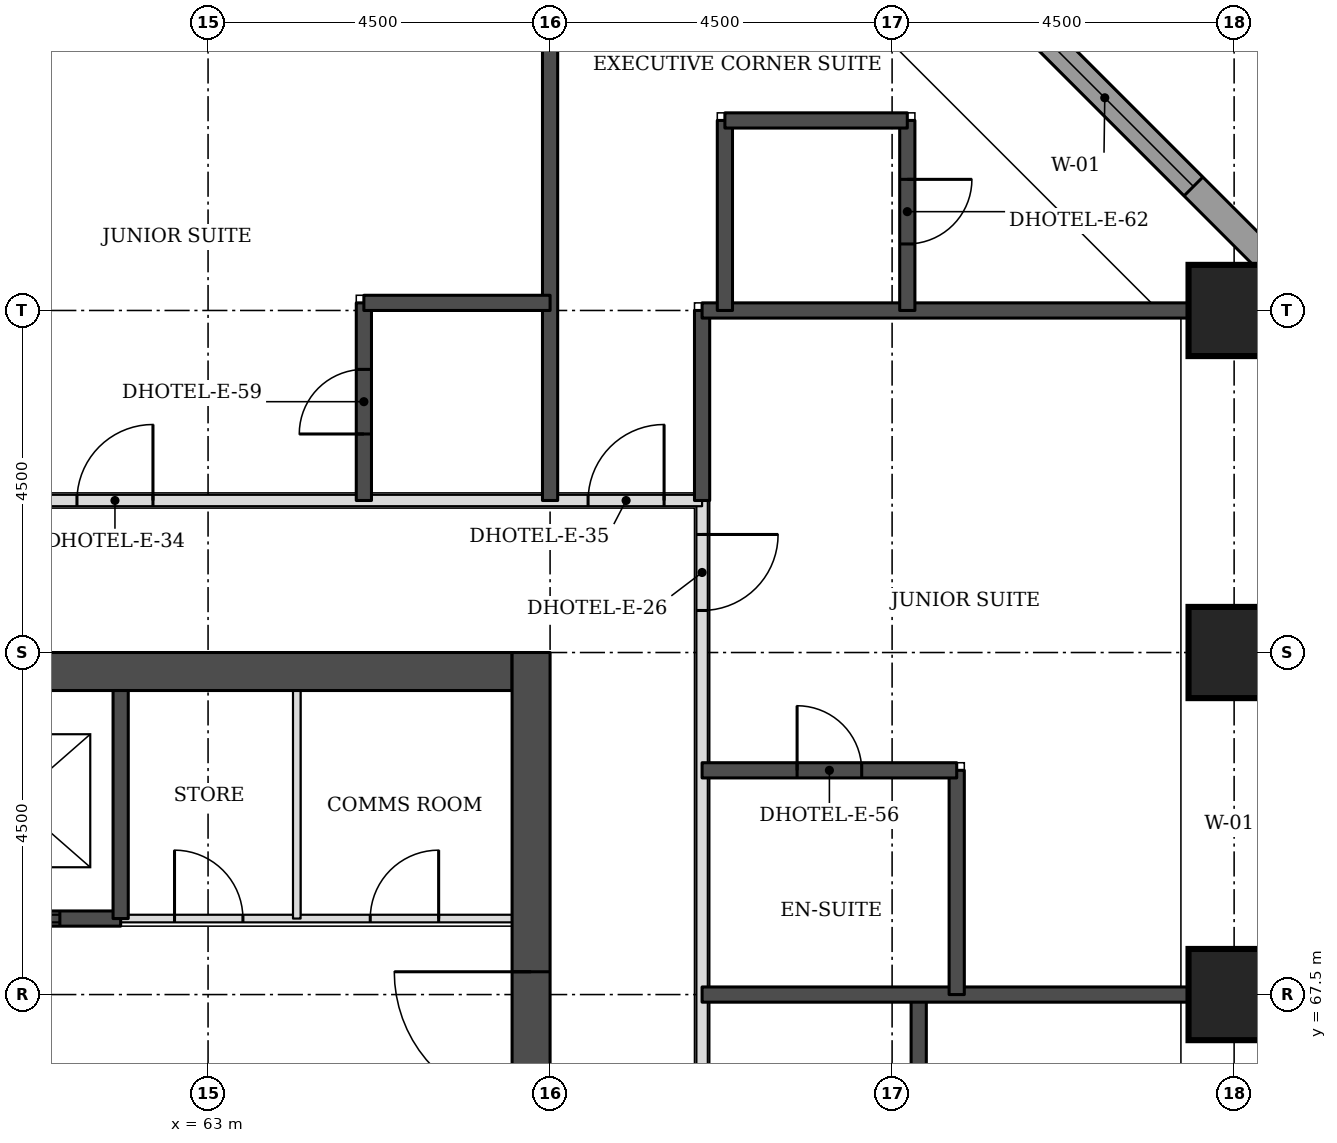
"""IFC4 building model, lengths in metres.
Left out: names, types, materials, properties, quantities, classifications, styles, units other than length and angle.
Written with IfcOpenShell. Run it as: python <this file> out.ifc"""

import sys

from ifc_helpers import new_model, si_unit, direction, frame, frame_2d, origin, origin_2d, place, context, subcontext, project, spatial, rectangle, extrude, element, fill, save


model = new_model("IFC4")
c1 = context("Model", 3, precision=1e-05, world=origin(), true_north=direction((0.0, 1.0)))
c2 = subcontext(c1, "Body", "Model", "MODEL_VIEW")
j1 = project(units=[si_unit("LENGTHUNIT", "METRE"), si_unit("PLANEANGLEUNIT", "RADIAN")], contexts=[c1])
p1 = place(None, origin())
s1 = spatial("IfcSite", under=j1, at=p1, CompositionType="ELEMENT")
p2 = place(p1, origin())
s2 = spatial("IfcBuilding", under=s1, at=p2, CompositionType="ELEMENT")
p3 = place(p2, frame((0.0, 0.0, 62.7)))
s3 = spatial("IfcBuildingStorey", under=s2, at=p3, CompositionType="ELEMENT", Elevation=62.7)
for number, where, z_axis, x_axis in (
    (1, (76.5, 67.5, 0.0), (0.0, 0.0, 1.0), (1.0, 0.0, 0.0)),
    (2, (76.5, 72.0, 0.0), (0.0, 0.0, 1.0), (1.0, 0.0, 0.0)),
    (3, (76.5, 76.5, 0.0), (0.0, 0.0, 1.0), (1.0, 0.0, 0.0)),
):
    element("IfcColumn", number, at=place(p3, frame(where, z_axis=z_axis, x_axis=x_axis)), inside=s3, PredefinedType="COLUMN", context=c2, shape_type="SweptSolid", body=[
        extrude(rectangle(XDim=1.2, YDim=1.2, at=origin_2d()), origin(), (0.0, 0.0, 1.0), 3.3),
    ])
p4 = place(p3, frame((45.5, 71.75, 0.0), z_axis=(0.0, 0.0, 1.0), x_axis=(1.0, 0.0, 0.0)))
e4 = element("IfcWall", 4, at=p4, inside=s3, PredefinedType="SHEAR", context=c2, shape_type="SweptSolid", body=[
    extrude(rectangle(XDim=21.5, YDim=0.5, at=frame_2d((10.75, 0.0))), origin(), (0.0, 0.0, 1.0), 3.3),
])
p5 = place(p3, frame((67.25, 49.5, 0.0), z_axis=(0.0, 0.0, 1.0), x_axis=(0.0, 1.0, 0.0)))
e5 = element("IfcWall", 5, at=p5, inside=s3, PredefinedType="SHEAR", context=c2, shape_type="SweptSolid", body=[
    extrude(rectangle(XDim=22.5, YDim=0.5, at=frame_2d((11.25, 0.0))), origin(), (0.0, 0.0, 1.0), 3.3),
])
p6 = place(p5, frame((4.2, 0.0, 0.0)))
e6 = element("IfcOpeningElement", 6, at=p6, cuts=e5, PredefinedType="OPENING", context=c2, shape_type="SweptSolid", body=[
    extrude(rectangle(XDim=1.8, YDim=2.1, at=frame_2d((0.9, 1.05))), frame((0.0, 0.26, 0.0), z_axis=(0.0, -1.0, 0.0), x_axis=(1.0, 0.0, 0.0)), (0.0, 0.0, 1.0), 0.52),
])
p7 = place(p5, frame((6.9, 0.0, 0.0)))
e7 = element("IfcOpeningElement", 7, at=p7, cuts=e5, PredefinedType="OPENING", context=c2, shape_type="SweptSolid", body=[
    extrude(rectangle(XDim=1.1, YDim=2.1, at=frame_2d((0.55, 1.05))), frame((0.0, 0.26, 0.0), z_axis=(0.0, -1.0, 0.0), x_axis=(1.0, 0.0, 0.0)), (0.0, 0.0, 1.0), 0.52),
])
p8 = place(p5, frame((13.6, 0.0, 0.0)))
e8 = element("IfcOpeningElement", 8, at=p8, cuts=e5, PredefinedType="OPENING", context=c2, shape_type="SweptSolid", body=[
    extrude(rectangle(XDim=1.1, YDim=2.1, at=frame_2d((0.55, 1.05))), frame((0.0, 0.26, 0.0), z_axis=(0.0, -1.0, 0.0), x_axis=(1.0, 0.0, 0.0)), (0.0, 0.0, 1.0), 0.52),
])
p9 = place(p5, frame((16.5, 0.0, 0.0)))
e9 = element("IfcOpeningElement", 9, at=p9, cuts=e5, PredefinedType="OPENING", context=c2, shape_type="SweptSolid", body=[
    extrude(rectangle(XDim=1.8, YDim=2.1, at=frame_2d((0.9, 1.05))), frame((0.0, 0.26, 0.0), z_axis=(0.0, -1.0, 0.0), x_axis=(1.0, 0.0, 0.0)), (0.0, 0.0, 1.0), 0.52),
])
p10 = place(p3, frame((77.326, 76.77, 0.0), z_axis=(0.0, 0.0, 1.0), x_axis=(-0.707106781187, 0.707106781187, 0.0)))
e10 = element("IfcWall", 10, at=p10, inside=s3, PredefinedType="STANDARD", context=c2, shape_type="SweptSolid", body=[
    extrude(rectangle(XDim=7.151, YDim=0.35, at=frame_2d((3.576, 0.0))), origin(), (0.0, 0.0, 1.0), 3.055),
])
p11 = place(p10, frame((1.926, 0.0, 0.8)))
e11 = element("IfcOpeningElement", 11, at=p11, cuts=e10, PredefinedType="OPENING", context=c2, shape_type="SweptSolid", body=[
    extrude(rectangle(XDim=3.3, YDim=1.5, at=frame_2d((1.65, 0.75))), frame((0.0, 0.185, 0.0), z_axis=(0.0, -1.0, 0.0), x_axis=(1.0, 0.0, 0.0)), (0.0, 0.0, 1.0), 0.37),
])
p12 = place(p3, frame((69.5, 47.5, 0.0), z_axis=(0.0, 0.0, 1.0), x_axis=(0.0, 1.0, 0.0)))
e12 = element("IfcWall", 12, at=p12, inside=s3, PredefinedType="PARTITIONING", context=c2, shape_type="SweptSolid", body=[
    extrude(rectangle(XDim=26.5, YDim=0.15, at=frame_2d((13.25, 0.0))), origin(), (0.0, 0.0, 1.0), 3.08),
])
p13 = place(p12, frame((25.053, 0.0, 0.0)))
e13 = element("IfcOpeningElement", 13, at=p13, cuts=e12, PredefinedType="OPENING", context=c2, shape_type="SweptSolid", body=[
    extrude(rectangle(XDim=1.0, YDim=2.1, at=frame_2d((0.5, 1.05))), frame((0.0, 0.085, 0.0), z_axis=(0.0, -1.0, 0.0), x_axis=(1.0, 0.0, 0.0)), (0.0, 0.0, 1.0), 0.17),
])
p14 = place(p12, frame((13.775, 0.0, 0.0)))
e14 = element("IfcOpeningElement", 14, at=p14, cuts=e12, PredefinedType="OPENING", context=c2, shape_type="SweptSolid", body=[
    extrude(rectangle(XDim=1.0, YDim=2.1, at=frame_2d((0.5, 1.05))), frame((0.0, 0.085, 0.0), z_axis=(0.0, -1.0, 0.0), x_axis=(1.0, 0.0, 0.0)), (0.0, 0.0, 1.0), 0.17),
])
p15 = place(p12, frame((7.65, 0.0, 0.0)))
e15 = element("IfcOpeningElement", 15, at=p15, cuts=e12, PredefinedType="OPENING", context=c2, shape_type="SweptSolid", body=[
    extrude(rectangle(XDim=1.1, YDim=2.1, at=frame_2d((0.55, 1.05))), frame((0.0, 0.085, 0.0), z_axis=(0.0, -1.0, 0.0), x_axis=(1.0, 0.0, 0.0)), (0.0, 0.0, 1.0), 0.17),
])
p16 = place(p12, frame((0.447, 0.0, 0.0)))
e16 = element("IfcOpeningElement", 16, at=p16, cuts=e12, PredefinedType="OPENING", context=c2, shape_type="SweptSolid", body=[
    extrude(rectangle(XDim=1.0, YDim=2.1, at=frame_2d((0.5, 1.05))), frame((0.0, 0.085, 0.0), z_axis=(0.0, -1.0, 0.0), x_axis=(1.0, 0.0, 0.0)), (0.0, 0.0, 1.0), 0.17),
])
p17 = place(p3, frame((43.0, 74.0, 0.0), z_axis=(0.0, 0.0, 1.0), x_axis=(1.0, 0.0, 0.0)))
e17 = element("IfcWall", 17, at=p17, inside=s3, PredefinedType="PARTITIONING", context=c2, shape_type="SweptSolid", body=[
    extrude(rectangle(XDim=26.5, YDim=0.15, at=frame_2d((13.25, 0.0))), origin(), (0.0, 0.0, 1.0), 3.08),
])
p18 = place(p17, frame((2.825, 0.0, 0.0)))
e18 = element("IfcOpeningElement", 18, at=p18, cuts=e17, PredefinedType="OPENING", context=c2, shape_type="SweptSolid", body=[
    extrude(rectangle(XDim=1.0, YDim=2.1, at=frame_2d((0.5, 1.05))), frame((0.0, 0.085, 0.0), z_axis=(0.0, -1.0, 0.0), x_axis=(1.0, 0.0, 0.0)), (0.0, 0.0, 1.0), 0.17),
])
p19 = place(p17, frame((11.975, 0.0, 0.0)))
e19 = element("IfcOpeningElement", 19, at=p19, cuts=e17, PredefinedType="OPENING", context=c2, shape_type="SweptSolid", body=[
    extrude(rectangle(XDim=1.0, YDim=2.1, at=frame_2d((0.5, 1.05))), frame((0.0, 0.085, 0.0), z_axis=(0.0, -1.0, 0.0), x_axis=(1.0, 0.0, 0.0)), (0.0, 0.0, 1.0), 0.17),
])
p20 = place(p17, frame((18.275, 0.0, 0.0)))
e20 = element("IfcOpeningElement", 20, at=p20, cuts=e17, PredefinedType="OPENING", context=c2, shape_type="SweptSolid", body=[
    extrude(rectangle(XDim=1.0, YDim=2.1, at=frame_2d((0.5, 1.05))), frame((0.0, 0.085, 0.0), z_axis=(0.0, -1.0, 0.0), x_axis=(1.0, 0.0, 0.0)), (0.0, 0.0, 1.0), 0.17),
])
p21 = place(p17, frame((0.5, 0.0, 0.0)))
e21 = element("IfcOpeningElement", 21, at=p21, cuts=e17, PredefinedType="OPENING", context=c2, shape_type="SweptSolid", body=[
    extrude(rectangle(XDim=1.0, YDim=2.1, at=frame_2d((0.5, 1.05))), frame((0.0, 0.085, 0.0), z_axis=(0.0, -1.0, 0.0), x_axis=(1.0, 0.0, 0.0)), (0.0, 0.0, 1.0), 0.17),
])
p22 = place(p17, frame((25.0, 0.0, 0.0)))
e22 = element("IfcOpeningElement", 22, at=p22, cuts=e17, PredefinedType="OPENING", context=c2, shape_type="SweptSolid", body=[
    extrude(rectangle(XDim=1.0, YDim=2.1, at=frame_2d((0.5, 1.05))), frame((0.0, 0.085, 0.0), z_axis=(0.0, -1.0, 0.0), x_axis=(1.0, 0.0, 0.0)), (0.0, 0.0, 1.0), 0.17),
])
p23 = place(p3, frame((72.35, 65.05, 0.0), z_axis=(0.0, 0.0, 1.0), x_axis=(0.0, 1.0, 0.0)))
e23 = element("IfcWall", 23, at=p23, inside=s3, PredefinedType="SOLIDWALL", context=c2, shape_type="SweptSolid", body=[
    extrude(rectangle(XDim=2.45, YDim=0.2, at=frame_2d((1.225, 0.0))), origin(), (0.0, 0.0, 1.0), 3.08),
])
p24 = place(p3, frame((69.5, 67.5, 0.0), z_axis=(0.0, 0.0, 1.0), x_axis=(1.0, 0.0, 0.0)))
e24 = element("IfcWall", 24, at=p24, inside=s3, PredefinedType="SOLIDWALL", context=c2, shape_type="SweptSolid", body=[
    extrude(rectangle(XDim=6.4, YDim=0.2, at=frame_2d((3.2, 0.0))), origin(), (0.0, 0.0, 1.0), 3.08),
])
p25 = place(p3, frame((72.85, 67.5, 0.0), z_axis=(0.0, 0.0, 1.0), x_axis=(0.0, 1.0, 0.0)))
e25 = element("IfcWall", 25, at=p25, inside=s3, PredefinedType="SOLIDWALL", context=c2, shape_type="SweptSolid", body=[
    extrude(rectangle(XDim=2.95, YDim=0.2, at=frame_2d((1.475, 0.0))), origin(), (0.0, 0.0, 1.0), 3.08),
])
p26 = place(p3, frame((69.5, 70.45, 0.0), z_axis=(0.0, 0.0, 1.0), x_axis=(1.0, 0.0, 0.0)))
e26 = element("IfcWall", 26, at=p26, inside=s3, PredefinedType="SOLIDWALL", context=c2, shape_type="SweptSolid", body=[
    extrude(rectangle(XDim=3.35, YDim=0.2, at=frame_2d((1.675, 0.0))), origin(), (0.0, 0.0, 1.0), 3.08),
])
p27 = place(p26, frame((1.25, 0.0, 0.0)))
e27 = element("IfcOpeningElement", 27, at=p27, cuts=e26, PredefinedType="OPENING", context=c2, shape_type="SweptSolid", body=[
    extrude(rectangle(XDim=0.85, YDim=2.1, at=frame_2d((0.425, 1.05))), frame((0.0, 0.11, 0.0), z_axis=(0.0, -1.0, 0.0), x_axis=(1.0, 0.0, 0.0)), (0.0, 0.0, 1.0), 0.22),
])
p28 = place(p3, frame((65.05, 74.0, 0.0), z_axis=(0.0, 0.0, 1.0), x_axis=(0.0, 1.0, 0.0)))
e28 = element("IfcWall", 28, at=p28, inside=s3, PredefinedType="SOLIDWALL", context=c2, shape_type="SweptSolid", body=[
    extrude(rectangle(XDim=2.6, YDim=0.2, at=frame_2d((1.3, 0.0))), origin(), (0.0, 0.0, 1.0), 3.08),
])
p29 = place(p28, frame((0.875, 0.0, 0.0)))
e29 = element("IfcOpeningElement", 29, at=p29, cuts=e28, PredefinedType="OPENING", context=c2, shape_type="SweptSolid", body=[
    extrude(rectangle(XDim=0.85, YDim=2.1, at=frame_2d((0.425, 1.05))), frame((0.0, 0.11, 0.0), z_axis=(0.0, -1.0, 0.0), x_axis=(1.0, 0.0, 0.0)), (0.0, 0.0, 1.0), 0.22),
])
p30 = place(p3, frame((67.5, 74.0, 0.0), z_axis=(0.0, 0.0, 1.0), x_axis=(0.0, 1.0, 0.0)))
e30 = element("IfcWall", 30, at=p30, inside=s3, PredefinedType="SOLIDWALL", context=c2, shape_type="SweptSolid", body=[
    extrude(rectangle(XDim=6.4, YDim=0.2, at=frame_2d((3.2, 0.0))), origin(), (0.0, 0.0, 1.0), 3.08),
])
p31 = place(p3, frame((69.5, 74.0, 0.0), z_axis=(0.0, 0.0, 1.0), x_axis=(0.0, 1.0, 0.0)))
e31 = element("IfcWall", 31, at=p31, inside=s3, PredefinedType="SOLIDWALL", context=c2, shape_type="SweptSolid", body=[
    extrude(rectangle(XDim=2.5, YDim=0.2, at=frame_2d((1.25, 0.0))), origin(), (0.0, 0.0, 1.0), 3.08),
])
p32 = place(p3, frame((69.5, 76.5, 0.0), z_axis=(0.0, 0.0, 1.0), x_axis=(1.0, 0.0, 0.0)))
e32 = element("IfcWall", 32, at=p32, inside=s3, PredefinedType="SOLIDWALL", context=c2, shape_type="SweptSolid", body=[
    extrude(rectangle(XDim=6.4, YDim=0.2, at=frame_2d((3.2, 0.0))), origin(), (0.0, 0.0, 1.0), 3.08),
])
p33 = place(p3, frame((69.8, 76.5, 0.0), z_axis=(0.0, 0.0, 1.0), x_axis=(0.0, 1.0, 0.0)))
e33 = element("IfcWall", 33, at=p33, inside=s3, PredefinedType="SOLIDWALL", context=c2, shape_type="SweptSolid", body=[
    extrude(rectangle(XDim=2.5, YDim=0.2, at=frame_2d((1.25, 0.0))), origin(), (0.0, 0.0, 1.0), 3.08),
])
p34 = place(p3, frame((72.2, 76.5, 0.0), z_axis=(0.0, 0.0, 1.0), x_axis=(0.0, 1.0, 0.0)))
e34 = element("IfcWall", 34, at=p34, inside=s3, PredefinedType="SOLIDWALL", context=c2, shape_type="SweptSolid", body=[
    extrude(rectangle(XDim=2.5, YDim=0.2, at=frame_2d((1.25, 0.0))), origin(), (0.0, 0.0, 1.0), 3.08),
])
p35 = place(p34, frame((0.875, 0.0, 0.0)))
e35 = element("IfcOpeningElement", 35, at=p35, cuts=e34, PredefinedType="OPENING", context=c2, shape_type="SweptSolid", body=[
    extrude(rectangle(XDim=0.85, YDim=2.1, at=frame_2d((0.425, 1.05))), frame((0.0, 0.11, 0.0), z_axis=(0.0, -1.0, 0.0), x_axis=(1.0, 0.0, 0.0)), (0.0, 0.0, 1.0), 0.22),
])
p36 = place(p3, frame((65.05, 76.6, 0.0), z_axis=(0.0, 0.0, 1.0), x_axis=(1.0, 0.0, 0.0)))
e36 = element("IfcWall", 36, at=p36, inside=s3, PredefinedType="SOLIDWALL", context=c2, shape_type="SweptSolid", body=[
    extrude(rectangle(XDim=2.45, YDim=0.2, at=frame_2d((1.225, 0.0))), origin(), (0.0, 0.0, 1.0), 3.08),
])
p37 = place(p3, frame((69.8, 79.0, 0.0), z_axis=(0.0, 0.0, 1.0), x_axis=(1.0, 0.0, 0.0)))
e37 = element("IfcWall", 37, at=p37, inside=s3, PredefinedType="SOLIDWALL", context=c2, shape_type="SweptSolid", body=[
    extrude(rectangle(XDim=2.4, YDim=0.2, at=frame_2d((1.2, 0.0))), origin(), (0.0, 0.0, 1.0), 3.08),
])
p38 = place(p3, frame((61.85, 68.5, 0.0), z_axis=(0.0, 0.0, 1.0), x_axis=(1.0, 0.0, 0.0)))
e38 = element("IfcWall", 38, at=p38, inside=s3, PredefinedType="PARTITIONING", context=c2, shape_type="SweptSolid", body=[
    extrude(rectangle(XDim=5.15, YDim=0.1, at=frame_2d((2.575, 0.0))), origin(), (0.0, 0.0, 1.0), 3.08),
])
p39 = place(p38, frame((3.284, 0.0, 0.0)))
e39 = element("IfcOpeningElement", 39, at=p39, cuts=e38, PredefinedType="OPENING", context=c2, shape_type="SweptSolid", body=[
    extrude(rectangle(XDim=0.9, YDim=2.1, at=frame_2d((0.45, 1.05))), frame((0.0, 0.06, 0.0), z_axis=(0.0, -1.0, 0.0), x_axis=(1.0, 0.0, 0.0)), (0.0, 0.0, 1.0), 0.12),
])
p40 = place(p38, frame((0.709, 0.0, 0.0)))
e40 = element("IfcOpeningElement", 40, at=p40, cuts=e38, PredefinedType="OPENING", context=c2, shape_type="SweptSolid", body=[
    extrude(rectangle(XDim=0.9, YDim=2.1, at=frame_2d((0.45, 1.05))), frame((0.0, 0.06, 0.0), z_axis=(0.0, -1.0, 0.0), x_axis=(1.0, 0.0, 0.0)), (0.0, 0.0, 1.0), 0.12),
])
p41 = place(p3, frame((50.65, 68.5, 0.0), z_axis=(0.0, 0.0, 1.0), x_axis=(1.0, 0.0, 0.0)))
e41 = element("IfcWall", 41, at=p41, inside=s3, PredefinedType="SOLIDWALL", context=c2, shape_type="SweptSolid", body=[
    extrude(rectangle(XDim=11.2, YDim=0.2, at=frame_2d((5.6, 0.0))), origin(), (0.0, 0.0, 1.0), 3.08),
])
p42 = place(p41, frame((0.8, 0.0, 0.0)))
e42 = element("IfcOpeningElement", 42, at=p42, cuts=e41, PredefinedType="OPENING", context=c2, shape_type="SweptSolid", body=[
    extrude(rectangle(XDim=1.2, YDim=2.1, at=frame_2d((0.6, 1.05))), frame((0.0, 0.11, 0.0), z_axis=(0.0, -1.0, 0.0), x_axis=(1.0, 0.0, 0.0)), (0.0, 0.0, 1.0), 0.22),
])
p43 = place(p41, frame((3.6, 0.0, 0.0)))
e43 = element("IfcOpeningElement", 43, at=p43, cuts=e41, PredefinedType="OPENING", context=c2, shape_type="SweptSolid", body=[
    extrude(rectangle(XDim=1.2, YDim=2.1, at=frame_2d((0.6, 1.05))), frame((0.0, 0.11, 0.0), z_axis=(0.0, -1.0, 0.0), x_axis=(1.0, 0.0, 0.0)), (0.0, 0.0, 1.0), 0.22),
])
p44 = place(p41, frame((6.4, 0.0, 0.0)))
e44 = element("IfcOpeningElement", 44, at=p44, cuts=e41, PredefinedType="OPENING", context=c2, shape_type="SweptSolid", body=[
    extrude(rectangle(XDim=1.2, YDim=2.1, at=frame_2d((0.6, 1.05))), frame((0.0, 0.11, 0.0), z_axis=(0.0, -1.0, 0.0), x_axis=(1.0, 0.0, 0.0)), (0.0, 0.0, 1.0), 0.22),
])
p45 = place(p41, frame((9.2, 0.0, 0.0)))
e45 = element("IfcOpeningElement", 45, at=p45, cuts=e41, PredefinedType="OPENING", context=c2, shape_type="SweptSolid", body=[
    extrude(rectangle(XDim=1.2, YDim=2.1, at=frame_2d((0.6, 1.05))), frame((0.0, 0.11, 0.0), z_axis=(0.0, -1.0, 0.0), x_axis=(1.0, 0.0, 0.0)), (0.0, 0.0, 1.0), 0.22),
])
p46 = place(p3, frame((61.85, 68.5, 0.0), z_axis=(0.0, 0.0, 1.0), x_axis=(0.0, 1.0, 0.0)))
e46 = element("IfcWall", 46, at=p46, inside=s3, PredefinedType="SOLIDWALL", context=c2, shape_type="SweptSolid", body=[
    extrude(rectangle(XDim=3.0, YDim=0.2, at=frame_2d((1.5, 0.0))), origin(), (0.0, 0.0, 1.0), 3.08),
])
p47 = place(p3, frame((64.167, 68.5, 0.0), z_axis=(0.0, 0.0, 1.0), x_axis=(0.0, 1.0, 0.0)))
e47 = element("IfcWall", 47, at=p47, inside=s3, PredefinedType="PARTITIONING", context=c2, shape_type="SweptSolid", body=[
    extrude(rectangle(XDim=3.0, YDim=0.1, at=frame_2d((1.5, 0.0))), origin(), (0.0, 0.0, 1.0), 3.08),
])
p48 = place(p11, origin())
e48 = element("IfcWindow", 48, at=p48, inside=s3, PartitioningType="SINGLE_PANEL", PredefinedType="WINDOW", context=c2, shape_type="SweptSolid", body=[
    extrude(rectangle(XDim=3.3, YDim=1.5, at=frame_2d((1.65, 0.75))), frame((0.0, 0.085, 0.0), z_axis=(0.0, -1.0, 0.0), x_axis=(1.0, 0.0, 0.0)), (0.0, 0.0, 1.0), 0.06),
])
fill(e11, e48)
p49 = place(p20, origin())
e49 = element("IfcDoor", 49, at=p49, inside=s3, OperationType="SINGLE_SWING_RIGHT", PredefinedType="DOOR", context=c2, shape_type="SweptSolid", body=[
    extrude(rectangle(XDim=1.0, YDim=2.1, at=frame_2d((0.5, 1.05))), frame((0.0, 0.025, 0.0), z_axis=(0.0, -1.0, 0.0), x_axis=(1.0, 0.0, 0.0)), (0.0, 0.0, 1.0), 0.05),
])
fill(e20, e49)
p50 = place(p29, origin())
e50 = element("IfcDoor", 50, at=p50, inside=s3, OperationType="SINGLE_SWING_LEFT", PredefinedType="DOOR", context=c2, shape_type="SweptSolid", body=[
    extrude(rectangle(XDim=0.85, YDim=2.1, at=frame_2d((0.425, 1.05))), frame((0.0, 0.025, 0.0), z_axis=(0.0, -1.0, 0.0), x_axis=(1.0, 0.0, 0.0)), (0.0, 0.0, 1.0), 0.05),
])
fill(e29, e50)
p51 = place(p13, frame((1.0, 0.0, 0.0), z_axis=(0.0, 0.0, 1.0), x_axis=(-1.0, 0.0, 0.0)))
e51 = element("IfcDoor", 51, at=p51, inside=s3, OperationType="SINGLE_SWING_LEFT", PredefinedType="DOOR", context=c2, shape_type="SweptSolid", body=[
    extrude(rectangle(XDim=1.0, YDim=2.1, at=frame_2d((0.5, 1.05))), frame((0.0, 0.025, 0.0), z_axis=(0.0, -1.0, 0.0), x_axis=(1.0, 0.0, 0.0)), (0.0, 0.0, 1.0), 0.05),
])
fill(e13, e51)
p52 = place(p27, origin())
e52 = element("IfcDoor", 52, at=p52, inside=s3, OperationType="SINGLE_SWING_LEFT", PredefinedType="DOOR", context=c2, shape_type="SweptSolid", body=[
    extrude(rectangle(XDim=0.85, YDim=2.1, at=frame_2d((0.425, 1.05))), frame((0.0, 0.025, 0.0), z_axis=(0.0, -1.0, 0.0), x_axis=(1.0, 0.0, 0.0)), (0.0, 0.0, 1.0), 0.05),
])
fill(e27, e52)
p53 = place(p22, origin())
e53 = element("IfcDoor", 53, at=p53, inside=s3, OperationType="SINGLE_SWING_RIGHT", PredefinedType="DOOR", context=c2, shape_type="SweptSolid", body=[
    extrude(rectangle(XDim=1.0, YDim=2.1, at=frame_2d((0.5, 1.05))), frame((0.0, 0.025, 0.0), z_axis=(0.0, -1.0, 0.0), x_axis=(1.0, 0.0, 0.0)), (0.0, 0.0, 1.0), 0.05),
])
fill(e22, e53)
p54 = place(p35, frame((0.85, 0.0, 0.0), z_axis=(0.0, 0.0, 1.0), x_axis=(-1.0, 0.0, 0.0)))
e54 = element("IfcDoor", 54, at=p54, inside=s3, OperationType="SINGLE_SWING_LEFT", PredefinedType="DOOR", context=c2, shape_type="SweptSolid", body=[
    extrude(rectangle(XDim=0.85, YDim=2.1, at=frame_2d((0.425, 1.05))), frame((0.0, 0.025, 0.0), z_axis=(0.0, -1.0, 0.0), x_axis=(1.0, 0.0, 0.0)), (0.0, 0.0, 1.0), 0.05),
])
fill(e35, e54)
p55 = place(p45, origin())
e55 = element("IfcDoor", 55, at=p55, inside=s3, OperationType="DOUBLE_DOOR_SLIDING", PredefinedType="DOOR", context=c2, shape_type="SweptSolid", body=[
    extrude(rectangle(XDim=1.2, YDim=2.1, at=frame_2d((0.6, 1.05))), frame((0.0, 0.025, 0.0), z_axis=(0.0, -1.0, 0.0), x_axis=(1.0, 0.0, 0.0)), (0.0, 0.0, 1.0), 0.05),
])
fill(e45, e55)
p56 = place(p9, origin())
e56 = element("IfcDoor", 56, at=p56, inside=s3, OperationType="SINGLE_SWING_RIGHT", PredefinedType="DOOR", context=c2, shape_type="SweptSolid", body=[
    extrude(rectangle(XDim=1.8, YDim=2.1, at=frame_2d((0.9, 1.05))), frame((0.0, 0.025, 0.0), z_axis=(0.0, -1.0, 0.0), x_axis=(1.0, 0.0, 0.0)), (0.0, 0.0, 1.0), 0.05),
])
fill(e9, e56)
p57 = place(p39, origin())
e57 = element("IfcDoor", 57, at=p57, inside=s3, OperationType="SINGLE_SWING_RIGHT", PredefinedType="DOOR", context=c2, shape_type="SweptSolid", body=[
    extrude(rectangle(XDim=0.9, YDim=2.1, at=frame_2d((0.45, 1.05))), frame((0.0, 0.025, 0.0), z_axis=(0.0, -1.0, 0.0), x_axis=(1.0, 0.0, 0.0)), (0.0, 0.0, 1.0), 0.05),
])
fill(e39, e57)
p58 = place(p40, origin())
e58 = element("IfcDoor", 58, at=p58, inside=s3, OperationType="SINGLE_SWING_LEFT", PredefinedType="DOOR", context=c2, shape_type="SweptSolid", body=[
    extrude(rectangle(XDim=0.9, YDim=2.1, at=frame_2d((0.45, 1.05))), frame((0.0, 0.025, 0.0), z_axis=(0.0, -1.0, 0.0), x_axis=(1.0, 0.0, 0.0)), (0.0, 0.0, 1.0), 0.05),
])
fill(e40, e58)
save(model, sys.argv[1])
